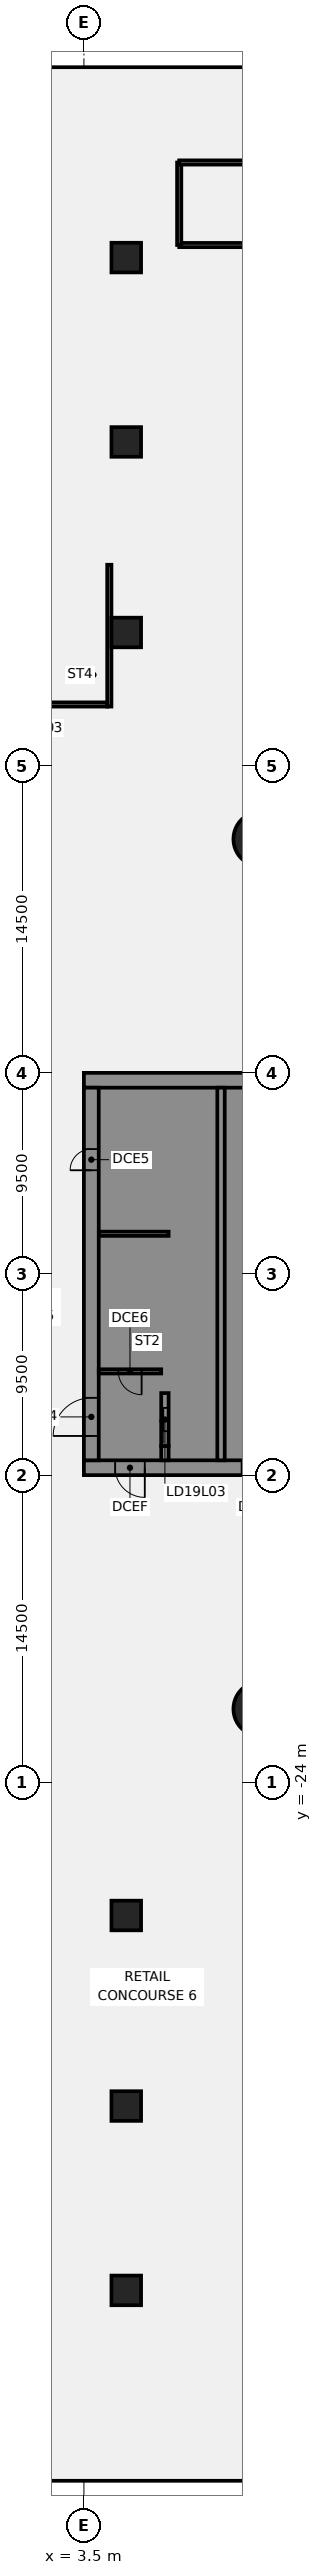
"""IFC4 building model, lengths in metres.
Left out: names, types, materials, properties, quantities, classifications, styles, units other than length and angle.
Written with IfcOpenShell. Run it as: python <this file> out.ifc"""

import sys

from ifc_helpers import new_model, si_unit, direction, frame, frame_2d, origin, origin_2d, place, context, subcontext, project, spatial, polyline, rectangle, circle, outline, extrude, element, fill, save


model = new_model("IFC4")
c1 = context("Model", 3, precision=1e-05, world=origin(), true_north=direction((0.0, 1.0)))
c2 = subcontext(c1, "Body", "Model", "MODEL_VIEW")
j1 = project(units=[si_unit("LENGTHUNIT", "METRE"), si_unit("PLANEANGLEUNIT", "RADIAN")], contexts=[c1])
p1 = place(None, origin())
s1 = spatial("IfcSite", under=j1, at=p1, CompositionType="ELEMENT")
p2 = place(p1, origin())
s2 = spatial("IfcBuilding", under=s1, at=p2, CompositionType="ELEMENT")
p3 = place(p2, frame((0.0, 0.0, 20.0)))
s3 = spatial("IfcBuildingStorey", under=s2, at=p3, CompositionType="ELEMENT", Elevation=20.0)
for number, where, z_axis, x_axis in (
    (1, (11.86, 20.543, -0.5), (0.0, 0.0, 1.0), (1.0, 0.0, 0.0)),
    (2, (11.86, -20.543, -0.5), (0.0, 0.0, 1.0), (1.0, 0.0, 0.0)),
):
    element("IfcColumn", number, at=place(p3, frame(where, z_axis=z_axis, x_axis=x_axis)), inside=s3, PredefinedType="COLUMN", context=c2, shape_type="SweptSolid", body=[
        extrude(circle(Radius=1.3, at=origin_2d()), origin(), (0.0, 0.0, 1.0), 5.05),
    ])
for number, where, z_axis, x_axis in (
    (3, (5.5, 39.3, -0.5), (0.0, 0.0, 1.0), (1.0, 0.0, 0.0)),
    (4, (5.5, 30.3, -0.5), (0.0, 0.0, 1.0), (1.0, 0.0, 0.0)),
    (5, (5.5, 48.008, -0.5), (0.0, 0.0, 1.0), (1.0, 0.0, 0.0)),
    (6, (5.5, -39.3, -0.5), (0.0, 0.0, 1.0), (1.0, 0.0, 0.0)),
    (7, (5.5, -30.3, -0.5), (0.0, 0.0, 1.0), (1.0, 0.0, 0.0)),
    (8, (5.5, -48.008, -0.5), (0.0, 0.0, 1.0), (1.0, 0.0, 0.0)),
):
    element("IfcColumn", number, at=place(p3, frame(where, z_axis=z_axis, x_axis=x_axis)), inside=s3, PredefinedType="COLUMN", context=c2, shape_type="SweptSolid", body=[
        extrude(rectangle(XDim=1.4, YDim=1.4, at=origin_2d()), origin(), (0.0, 0.0, 1.0), 5.05),
    ])
p4 = place(p3, frame((8.0, 48.6, 0.0), z_axis=(0.0, 0.0, 1.0), x_axis=(1.0, 0.0, 0.0)))
e9 = element("IfcWall", 9, at=p4, inside=s3, PredefinedType="PARTITIONING", context=c2, shape_type="SweptSolid", body=[
    extrude(rectangle(XDim=11.5, YDim=0.2, at=frame_2d((5.75, 0.0))), origin(), (0.0, 0.0, 1.0), 4.55),
])
p5 = place(p4, frame((9.78, 0.0, 0.0)))
e10 = element("IfcOpeningElement", 10, at=p5, cuts=e9, PredefinedType="OPENING", context=c2, shape_type="SweptSolid", body=[
    extrude(rectangle(XDim=1.2, YDim=2.1, at=frame_2d((0.6, 1.05))), frame((0.0, 0.11, 0.0), z_axis=(0.0, -1.0, 0.0), x_axis=(1.0, 0.0, 0.0)), (0.0, 0.0, 1.0), 0.22),
])
p6 = place(p3, frame((8.0, 48.6, 0.0), z_axis=(0.0, 0.0, 1.0), x_axis=(0.0, 1.0, 0.0)))
e11 = element("IfcWall", 11, at=p6, inside=s3, PredefinedType="PARTITIONING", context=c2, shape_type="SweptSolid", body=[
    extrude(rectangle(XDim=3.9, YDim=0.2, at=frame_2d((1.95, 0.0))), origin(), (0.0, 0.0, 1.0), 4.55),
])
p7 = place(p3, frame((8.0, 52.5, 0.0), z_axis=(0.0, 0.0, 1.0), x_axis=(1.0, 0.0, 0.0)))
e12 = element("IfcWall", 12, at=p7, inside=s3, PredefinedType="PARTITIONING", context=c2, shape_type="SweptSolid", body=[
    extrude(rectangle(XDim=11.5, YDim=0.2, at=frame_2d((5.75, 0.0))), origin(), (0.0, 0.0, 1.0), 4.55),
])
p8 = place(p3, frame((16.5, -9.15, 0.0), z_axis=(0.0, 0.0, 1.0), x_axis=(-1.0, 0.0, 0.0)))
e13 = element("IfcWall", 13, at=p8, inside=s3, PredefinedType="SHEAR", context=c2, shape_type="SweptSolid", body=[
    extrude(rectangle(XDim=13.0, YDim=0.7, at=frame_2d((6.5, 0.0))), origin(), (0.0, 0.0, 1.0), 4.55),
])
p9 = place(p8, frame((4.15, 0.0, 0.0)))
e14 = element("IfcOpeningElement", 14, at=p9, cuts=e13, PredefinedType="OPENING", context=c2, shape_type="SweptSolid", body=[
    extrude(rectangle(XDim=1.4, YDim=2.1, at=frame_2d((0.7, 1.05))), frame((0.0, 0.36, 0.0), z_axis=(0.0, -1.0, 0.0), x_axis=(1.0, 0.0, 0.0)), (0.0, 0.0, 1.0), 0.72),
])
p10 = place(p8, frame((10.125, 0.0, 0.0)))
e15 = element("IfcOpeningElement", 15, at=p10, cuts=e13, PredefinedType="OPENING", context=c2, shape_type="SweptSolid", body=[
    extrude(rectangle(XDim=1.4, YDim=2.1, at=frame_2d((0.7, 1.05))), frame((0.0, 0.36, 0.0), z_axis=(0.0, -1.0, 0.0), x_axis=(1.0, 0.0, 0.0)), (0.0, 0.0, 1.0), 0.72),
])
p11 = place(p3, frame((16.5, 9.15, 0.0), z_axis=(0.0, 0.0, 1.0), x_axis=(-1.0, 0.0, 0.0)))
e16 = element("IfcWall", 16, at=p11, inside=s3, PredefinedType="SHEAR", context=c2, shape_type="SweptSolid", body=[
    extrude(rectangle(XDim=13.0, YDim=0.7, at=frame_2d((6.5, 0.0))), origin(), (0.0, 0.0, 1.0), 4.55),
])
p12 = place(p3, origin())
e17 = element("IfcWall", 17, at=p12, inside=s3, PredefinedType="SHEAR", context=c2, shape_type="SweptSolid", body=[
    extrude(outline(polyline([(9.8, -5.375), (7.5, -5.375), (7.5, -2.875), (9.8, -2.875), (9.8, -2.625), (7.5, -2.625), (7.5, -0.125), (9.8, -0.125), (9.8, 0.125), (7.5, 0.125), (7.5, 2.625), (9.8, 2.625), (9.8, 2.875), (7.5, 2.875), (7.5, 5.375), (9.8, 5.375), (9.8, 5.625), (7.5, 5.625), (7.5, 8.125), (9.8, 8.125), (9.8, 8.8), (7.5, 8.8), (7.15, 8.8), (7.15, -5.625), (7.5, -5.625), (9.8, -5.625), (9.8, -5.375)])), origin(), (0.0, 0.0, 1.0), 4.55),
])
p13 = place(p3, origin())
e18 = element("IfcWall", 18, at=p13, inside=s3, PredefinedType="SHEAR", context=c2, shape_type="SweptSolid", body=[
    extrude(outline(polyline([(7.5, -8.125), (7.5, -8.8), (9.8, -8.8), (9.8, -8.125), (9.8, -5.625), (9.55, -5.625), (9.55, -8.125), (7.5, -8.125)])), origin(), (0.0, 0.0, 1.0), 4.55),
])
p14 = place(p3, frame((7.325, -8.8, 0.0), z_axis=(0.0, 0.0, 1.0), x_axis=(0.0, 1.0, 0.0)))
e19 = element("IfcWall", 19, at=p14, inside=s3, PredefinedType="SHEAR", context=c2, shape_type="SweptSolid", body=[
    extrude(rectangle(XDim=0.675, YDim=0.35, at=frame_2d((0.337, 0.0))), origin(), (0.0, 0.0, 1.0), 4.55),
])
p15 = place(p3, frame((7.5, 1.9, 0.0), z_axis=(0.0, 0.0, 1.0), x_axis=(-1.0, 0.0, 0.0)))
e20 = element("IfcWall", 20, at=p15, inside=s3, PredefinedType="SHEAR", context=c2, shape_type="SweptSolid", body=[
    extrude(rectangle(XDim=3.3, YDim=0.2, at=frame_2d((1.65, 0.0))), origin(), (0.0, 0.0, 1.0), 4.55),
])
p16 = place(p3, frame((9.975, -8.8, 0.0), z_axis=(0.0, 0.0, 1.0), x_axis=(0.0, 1.0, 0.0)))
e21 = element("IfcWall", 21, at=p16, inside=s3, PredefinedType="SHEAR", context=c2, shape_type="SweptSolid", body=[
    extrude(rectangle(XDim=17.6, YDim=0.35, at=frame_2d((8.8, 0.0))), origin(), (0.0, 0.0, 1.0), 4.55),
])
p17 = place(p3, frame((7.325, -8.125, 0.0), z_axis=(0.0, 0.0, 1.0), x_axis=(0.0, 1.0, 0.0)))
e22 = element("IfcWall", 22, at=p17, inside=s3, PredefinedType="SHEAR", context=c2, shape_type="SweptSolid", body=[
    extrude(rectangle(XDim=2.5, YDim=0.35, at=frame_2d((1.25, 0.0))), origin(), (0.0, 0.0, 1.0), 4.55),
])
p18 = place(p17, frame((0.7, 0.0, 0.0)))
e23 = element("IfcOpeningElement", 23, at=p18, cuts=e22, PredefinedType="OPENING", context=c2, shape_type="SweptSolid", body=[
    extrude(rectangle(XDim=1.1, YDim=2.1, at=frame_2d((0.55, 1.05))), frame((0.0, 0.185, 0.0), z_axis=(0.0, -1.0, 0.0), x_axis=(1.0, 0.0, 0.0)), (0.0, 0.0, 1.0), 0.37),
])
p19 = place(p3, frame((3.85, -8.8, 0.0), z_axis=(0.0, 0.0, 1.0), x_axis=(0.0, 1.0, 0.0)))
e24 = element("IfcWall", 24, at=p19, inside=s3, PredefinedType="SHEAR", context=c2, shape_type="SweptSolid", body=[
    extrude(rectangle(XDim=17.6, YDim=0.7, at=frame_2d((8.8, 0.0))), origin(), (0.0, 0.0, 1.0), 4.55),
])
p20 = place(p19, frame((1.15, 0.0, 0.0)))
e25 = element("IfcOpeningElement", 25, at=p20, cuts=e24, PredefinedType="OPENING", context=c2, shape_type="SweptSolid", body=[
    extrude(rectangle(XDim=1.8, YDim=2.1, at=frame_2d((0.9, 1.05))), frame((0.0, 0.36, 0.0), z_axis=(0.0, -1.0, 0.0), x_axis=(1.0, 0.0, 0.0)), (0.0, 0.0, 1.0), 0.72),
])
p21 = place(p19, frame((13.7, 0.0, 0.0)))
e26 = element("IfcOpeningElement", 26, at=p21, cuts=e24, PredefinedType="OPENING", context=c2, shape_type="SweptSolid", body=[
    extrude(rectangle(XDim=1.0, YDim=2.1, at=frame_2d((0.5, 1.05))), frame((0.0, 0.36, 0.0), z_axis=(0.0, -1.0, 0.0), x_axis=(1.0, 0.0, 0.0)), (0.0, 0.0, 1.0), 0.72),
])
p22 = place(p3, frame((7.15, -4.6, 0.0), z_axis=(0.0, 0.0, 1.0), x_axis=(-1.0, 0.0, 0.0)))
e27 = element("IfcWall", 27, at=p22, inside=s3, PredefinedType="SHEAR", context=c2, shape_type="SweptSolid", body=[
    extrude(rectangle(XDim=2.95, YDim=0.2, at=frame_2d((1.475, 0.0))), origin(), (0.0, 0.0, 1.0), 4.55),
])
p23 = place(p22, frame((0.925, 0.0, 0.0)))
e28 = element("IfcOpeningElement", 28, at=p23, cuts=e27, PredefinedType="OPENING", context=c2, shape_type="SweptSolid", body=[
    extrude(rectangle(XDim=1.1, YDim=2.1, at=frame_2d((0.55, 1.05))), frame((0.0, 0.11, 0.0), z_axis=(0.0, -1.0, 0.0), x_axis=(1.0, 0.0, 0.0)), (0.0, 0.0, 1.0), 0.22),
])
p24 = place(p3, frame((4.7, 26.8, 0.0), z_axis=(0.0, 0.0, 1.0), x_axis=(0.0, 1.0, 0.0)))
e29 = element("IfcWall", 29, at=p24, inside=s3, PredefinedType="SHEAR", context=c2, shape_type="SweptSolid", body=[
    extrude(rectangle(XDim=6.7, YDim=0.2, at=frame_2d((3.35, 0.0))), origin(), (0.0, 0.0, 1.0), 4.55),
])
p25 = place(p3, frame((4.6, 26.9, 0.0), z_axis=(0.0, 0.0, 1.0), x_axis=(-1.0, 0.0, 0.0)))
e30 = element("IfcWall", 30, at=p25, inside=s3, PredefinedType="SHEAR", context=c2, shape_type="SweptSolid", body=[
    extrude(rectangle(XDim=3.2, YDim=0.2, at=frame_2d((1.6, 0.0))), origin(), (0.0, 0.0, 1.0), 4.55),
])
p26 = place(p3, origin())
e31 = element("IfcWall", 31, at=p26, inside=s3, PredefinedType="SHEAR", context=c2, shape_type="SweptSolid", body=[
    extrude(outline(polyline([(4.6, 33.3), (4.6, 33.5), (1.4, 33.5), (1.4, 33.3), (4.6, 33.3)])), origin(), (0.0, 0.0, 1.0), 4.55),
])
p27 = place(p9, origin())
e32 = element("IfcDoor", 32, at=p27, inside=s3, OperationType="SINGLE_SWING_LEFT", PredefinedType="DOOR", context=c2, shape_type="SweptSolid", body=[
    extrude(rectangle(XDim=1.4, YDim=2.1, at=frame_2d((0.7, 1.05))), frame((0.0, 0.025, 0.0), z_axis=(0.0, -1.0, 0.0), x_axis=(1.0, 0.0, 0.0)), (0.0, 0.0, 1.0), 0.05),
])
fill(e14, e32)
p28 = place(p10, origin())
e33 = element("IfcDoor", 33, at=p28, inside=s3, OperationType="SINGLE_SWING_LEFT", PredefinedType="DOOR", context=c2, shape_type="SweptSolid", body=[
    extrude(rectangle(XDim=1.4, YDim=2.1, at=frame_2d((0.7, 1.05))), frame((0.0, 0.025, 0.0), z_axis=(0.0, -1.0, 0.0), x_axis=(1.0, 0.0, 0.0)), (0.0, 0.0, 1.0), 0.05),
])
fill(e15, e33)
p29 = place(p20, origin())
e34 = element("IfcDoor", 34, at=p29, inside=s3, OperationType="SINGLE_SWING_LEFT", PredefinedType="DOOR", context=c2, shape_type="SweptSolid", body=[
    extrude(rectangle(XDim=1.8, YDim=2.1, at=frame_2d((0.9, 1.05))), frame((0.0, 0.025, 0.0), z_axis=(0.0, -1.0, 0.0), x_axis=(1.0, 0.0, 0.0)), (0.0, 0.0, 1.0), 0.05),
])
fill(e25, e34)
p30 = place(p21, origin())
e35 = element("IfcDoor", 35, at=p30, inside=s3, OperationType="SINGLE_SWING_LEFT", PredefinedType="DOOR", context=c2, shape_type="SweptSolid", body=[
    extrude(rectangle(XDim=1.0, YDim=2.1, at=frame_2d((0.5, 1.05))), frame((0.0, 0.025, 0.0), z_axis=(0.0, -1.0, 0.0), x_axis=(1.0, 0.0, 0.0)), (0.0, 0.0, 1.0), 0.05),
])
fill(e26, e35)
p31 = place(p23, origin())
e36 = element("IfcDoor", 36, at=p31, inside=s3, OperationType="SINGLE_SWING_LEFT", PredefinedType="DOOR", context=c2, shape_type="SweptSolid", body=[
    extrude(rectangle(XDim=1.1, YDim=2.1, at=frame_2d((0.55, 1.05))), frame((0.0, 0.025, 0.0), z_axis=(0.0, -1.0, 0.0), x_axis=(1.0, 0.0, 0.0)), (0.0, 0.0, 1.0), 0.05),
])
fill(e28, e36)
p32 = place(p18, origin())
e37 = element("IfcDoor", 37, at=p32, inside=s3, OperationType="SLIDING_TO_LEFT", PredefinedType="DOOR", context=c2, shape_type="SweptSolid", body=[
    extrude(rectangle(XDim=1.1, YDim=2.1, at=frame_2d((0.55, 1.05))), frame((0.0, 0.025, 0.0), z_axis=(0.0, -1.0, 0.0), x_axis=(1.0, 0.0, 0.0)), (0.0, 0.0, 1.0), 0.05),
])
fill(e23, e37)
save(model, sys.argv[1])
